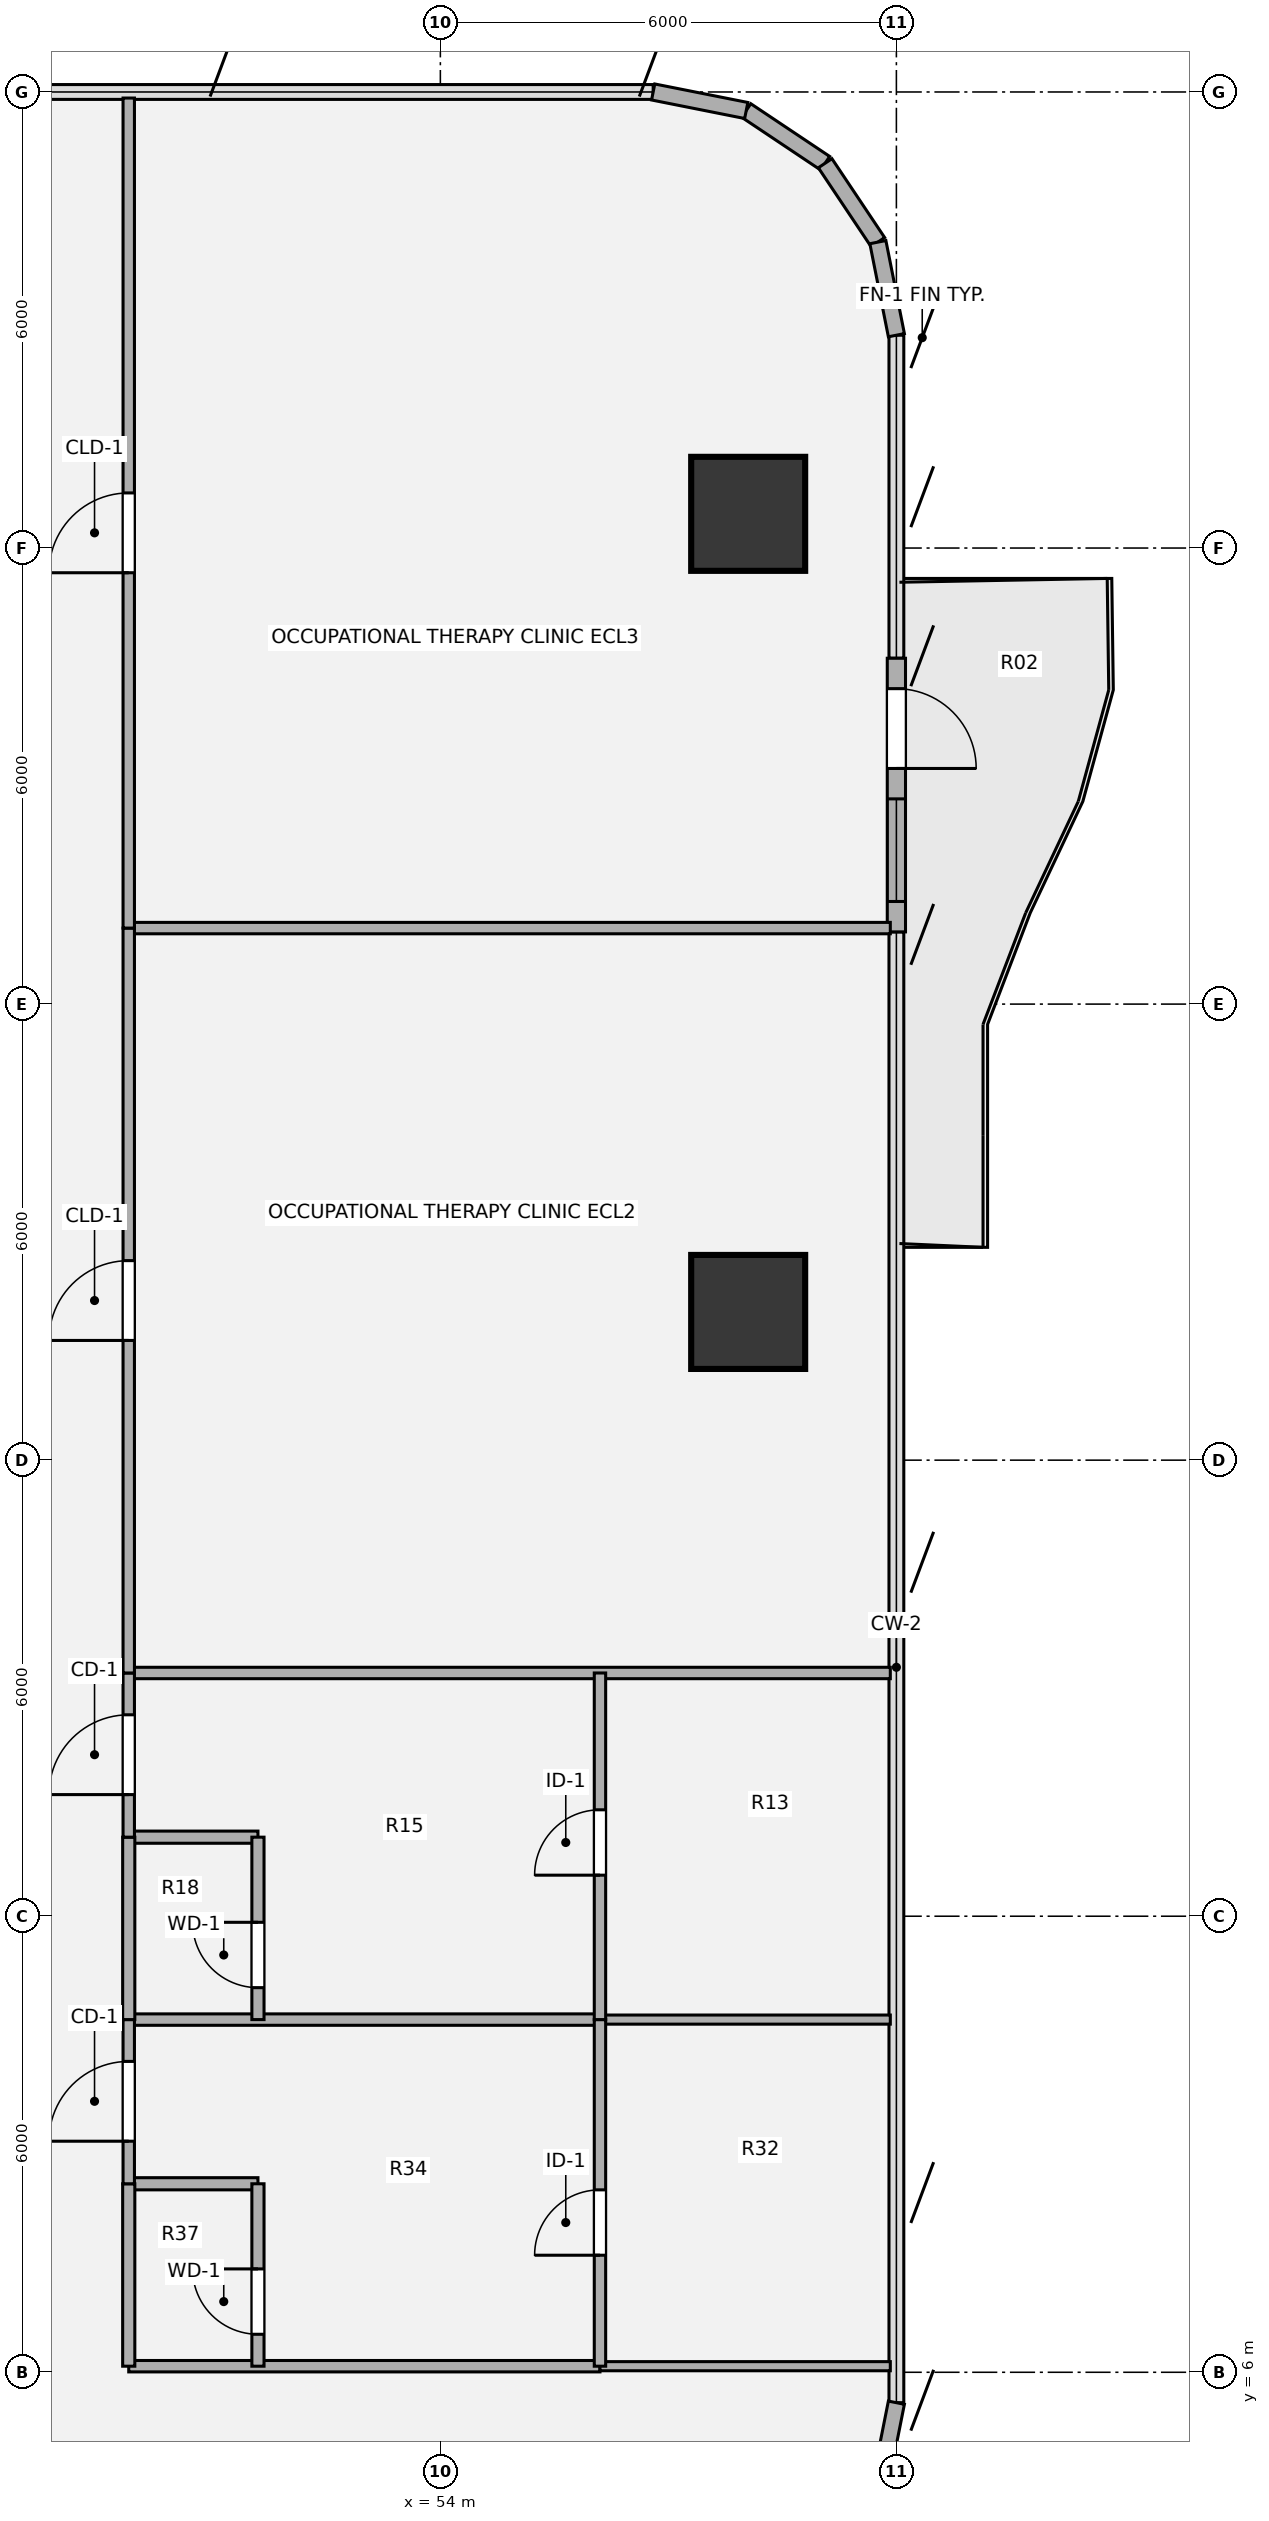
"""IFC4 building model, lengths in metres.
Left out: names, types, materials, properties, quantities, classifications, styles, units other than length and angle.
Written with IfcOpenShell. Run it as: python <this file> out.ifc"""

import sys

from ifc_helpers import new_model, si_unit, direction, frame, frame_2d, origin, origin_2d, place, context, subcontext, project, spatial, rectangle, hollow_circle, extrude, source, transform, mapped, element, fill, save


model = new_model("IFC4")
c1 = context("Model", 3, precision=1e-05, world=origin(), true_north=direction((0.0, 1.0)))
c2 = subcontext(c1, "Body", "Model", "MODEL_VIEW")
j1 = project(units=[si_unit("LENGTHUNIT", "METRE"), si_unit("PLANEANGLEUNIT", "RADIAN")], contexts=[c1])
p1 = place(None, origin())
s1 = spatial("IfcSite", under=j1, at=p1, CompositionType="ELEMENT")
p2 = place(p1, origin())
s2 = spatial("IfcBuilding", under=s1, at=p2, CompositionType="ELEMENT")
p3 = place(p2, frame((0.0, 0.0, 45.9)))
s3 = spatial("IfcBuildingStorey", under=s2, at=p3, CompositionType="ELEMENT", Elevation=45.9)
m1 = source(origin(), c2, "Body", "SweptSolid", [
    extrude(hollow_circle(Radius=0.75, WallThickness=0.05, at=origin_2d()), origin(), (0.0, 0.0, 1.0), 3.78),
])
for number, where, z_axis, x_axis in (
    (1, (58.05, 19.95, 0.0), (0.0, 0.0, 1.0), (1.0, 0.0, 0.0)),
    (2, (58.05, 30.45, 0.0), (0.0, 0.0, 1.0), (1.0, 0.0, 0.0)),
):
    element("IfcColumn", number, at=place(p3, frame(where, z_axis=z_axis, x_axis=x_axis)), inside=s3, PredefinedType="COLUMN", context=c2, shape_type="MappedRepresentation", body=[
        mapped(m1, transform((0.0, 0.0, 0.0), x_axis=(1.0, 0.0, 0.0), y_axis=(0.0, 1.0, 0.0), z_axis=(0.0, 0.0, 1.0), scale=1.0)),
    ])
for number, where, z_axis, x_axis in (
    (3, (58.025, 35.756, 0.0), (0.0, 0.0, 1.0), (0.831, -0.556, 0.0)),
    (4, (59.063, 35.063, 0.0), (0.0, 0.0, 1.0), (0.556, -0.831, 0.0)),
    (5, (59.756, 34.025, 0.0), (0.0, 0.0, 1.0), (0.195, -0.981, 0.0)),
):
    element("IfcWall", number, at=place(p3, frame(where, z_axis=z_axis, x_axis=x_axis)), inside=s3, PredefinedType="SOLIDWALL", context=c2, shape_type="SweptSolid", body=[
        extrude(rectangle(XDim=1.249, YDim=0.215, at=frame_2d((0.624, 0.0))), origin(), (0.0, 0.0, 1.0), 3.53),
    ])
p4 = place(p3, frame((60.0, 28.55, 0.0), z_axis=(0.0, 0.0, 1.0), x_axis=(0.0, -1.0, 0.0)))
e6 = element("IfcWall", 6, at=p4, inside=s3, PredefinedType="SOLIDWALL", context=c2, shape_type="SweptSolid", body=[
    extrude(rectangle(XDim=3.6, YDim=0.24, at=frame_2d((1.8, 0.0))), origin(), (0.0, 0.0, 1.0), 3.53),
])
p5 = place(p4, frame((0.4, 0.0, 0.0)))
e7 = element("IfcOpeningElement", 7, at=p5, cuts=e6, PredefinedType="OPENING", context=c2, shape_type="SweptSolid", body=[
    extrude(rectangle(XDim=1.05, YDim=2.15, at=origin_2d()), frame((0.525, 0.13, 1.075), z_axis=(0.0, -1.0, 0.0), x_axis=(1.0, 0.0, 0.0)), (0.0, 0.0, 1.0), 0.26),
])
p6 = place(p4, frame((1.85, 0.0, 0.85)))
e8 = element("IfcOpeningElement", 8, at=p6, cuts=e6, PredefinedType="OPENING", context=c2, shape_type="SweptSolid", body=[
    extrude(rectangle(XDim=1.35, YDim=1.35, at=origin_2d()), frame((0.675, 0.13, 0.675), z_axis=(0.0, -1.0, 0.0), x_axis=(1.0, 0.0, 0.0)), (0.0, 0.0, 1.0), 0.26),
])
for number, where, z_axis, x_axis in (
    (9, (60.0, 5.6, 0.0), (0.0, 0.0, 1.0), (-0.195, -0.981, 0.0)),
    (10, (56.8, 36.0, 0.0), (0.0, 0.0, 1.0), (0.981, -0.195, 0.0)),
):
    element("IfcWall", number, at=place(p3, frame(where, z_axis=z_axis, x_axis=x_axis)), inside=s3, PredefinedType="SOLIDWALL", context=c2, shape_type="SweptSolid", body=[
        extrude(rectangle(XDim=1.249, YDim=0.215, at=frame_2d((0.624, 0.0))), origin(), (0.0, 0.0, 1.0), 3.53),
    ])
p7 = place(p3, frame((49.9, 6.08, 0.0), z_axis=(0.0, 0.0, 1.0), x_axis=(1.0, 0.0, 0.0)))
e11 = element("IfcWall", 11, at=p7, inside=s3, PredefinedType="PARTITIONING", context=c2, shape_type="SweptSolid", body=[
    extrude(rectangle(XDim=6.2, YDim=0.15, at=frame_2d((3.1, 0.0))), origin(), (0.0, 0.0, 1.0), 3.5),
])
p8 = place(p3, frame((56.1, 6.08, 0.0), z_axis=(0.0, 0.0, 1.0), x_axis=(1.0, 0.0, 0.0)))
e12 = element("IfcWall", 12, at=p8, inside=s3, PredefinedType="PARTITIONING", context=c2, shape_type="SweptSolid", body=[
    extrude(rectangle(XDim=3.82, YDim=0.12, at=frame_2d((1.91, 0.0))), origin(), (0.0, 0.0, 1.0), 3.5),
])
p9 = place(p3, frame((49.9, 8.48, 0.0), z_axis=(0.0, 0.0, 1.0), x_axis=(1.0, 0.0, 0.0)))
e13 = element("IfcWall", 13, at=p9, inside=s3, PredefinedType="PLUMBINGWALL", context=c2, shape_type="SweptSolid", body=[
    extrude(rectangle(XDim=1.7, YDim=0.16, at=frame_2d((0.85, 0.0))), origin(), (0.0, 0.0, 1.0), 3.5),
])
p10 = place(p3, frame((49.9, 10.64, 0.0), z_axis=(0.0, 0.0, 1.0), x_axis=(1.0, 0.0, 0.0)))
e14 = element("IfcWall", 14, at=p10, inside=s3, PredefinedType="PARTITIONING", context=c2, shape_type="SweptSolid", body=[
    extrude(rectangle(XDim=6.2, YDim=0.15, at=frame_2d((3.1, 0.0))), origin(), (0.0, 0.0, 1.0), 3.5),
])
p11 = place(p3, frame((56.1, 10.64, 0.0), z_axis=(0.0, 0.0, 1.0), x_axis=(1.0, 0.0, 0.0)))
e15 = element("IfcWall", 15, at=p11, inside=s3, PredefinedType="PARTITIONING", context=c2, shape_type="SweptSolid", body=[
    extrude(rectangle(XDim=3.82, YDim=0.12, at=frame_2d((1.91, 0.0))), origin(), (0.0, 0.0, 1.0), 3.5),
])
p12 = place(p3, frame((49.9, 13.04, 0.0), z_axis=(0.0, 0.0, 1.0), x_axis=(1.0, 0.0, 0.0)))
e16 = element("IfcWall", 16, at=p12, inside=s3, PredefinedType="PLUMBINGWALL", context=c2, shape_type="SweptSolid", body=[
    extrude(rectangle(XDim=1.7, YDim=0.16, at=frame_2d((0.85, 0.0))), origin(), (0.0, 0.0, 1.0), 3.5),
])
p13 = place(p3, frame((49.9, 15.2, 0.0), z_axis=(0.0, 0.0, 1.0), x_axis=(1.0, 0.0, 0.0)))
e17 = element("IfcWall", 17, at=p13, inside=s3, PredefinedType="PARTITIONING", context=c2, shape_type="SweptSolid", body=[
    extrude(rectangle(XDim=10.02, YDim=0.15, at=frame_2d((5.01, 0.0))), origin(), (0.0, 0.0, 1.0), 3.5),
])
p14 = place(p3, frame((49.9, 25.0, 0.0), z_axis=(0.0, 0.0, 1.0), x_axis=(1.0, 0.0, 0.0)))
e18 = element("IfcWall", 18, at=p14, inside=s3, PredefinedType="PARTITIONING", context=c2, shape_type="SweptSolid", body=[
    extrude(rectangle(XDim=10.02, YDim=0.15, at=frame_2d((5.01, 0.0))), origin(), (0.0, 0.0, 1.0), 2.982),
])
p15 = place(p3, frame((49.9, 6.08, 0.0), z_axis=(0.0, 0.0, 1.0), x_axis=(0.0, 1.0, 0.0)))
e19 = element("IfcWall", 19, at=p15, inside=s3, PredefinedType="PLUMBINGWALL", context=c2, shape_type="SweptSolid", body=[
    extrude(rectangle(XDim=2.4, YDim=0.16, at=frame_2d((1.2, 0.0))), origin(), (0.0, 0.0, 1.0), 3.5),
])
p16 = place(p3, frame((49.9, 8.48, 0.0), z_axis=(0.0, 0.0, 1.0), x_axis=(0.0, 1.0, 0.0)))
e20 = element("IfcWall", 20, at=p16, inside=s3, PredefinedType="PARTITIONING", context=c2, shape_type="SweptSolid", body=[
    extrude(rectangle(XDim=2.16, YDim=0.15, at=frame_2d((1.08, 0.0))), origin(), (0.0, 0.0, 1.0), 3.5),
])
p17 = place(p16, frame((0.56, 0.0, 0.0)))
e21 = element("IfcOpeningElement", 21, at=p17, cuts=e20, PredefinedType="OPENING", context=c2, shape_type="SweptSolid", body=[
    extrude(rectangle(XDim=1.05, YDim=2.1, at=origin_2d()), frame((0.525, 0.085, 1.05), z_axis=(0.0, -1.0, 0.0), x_axis=(1.0, 0.0, 0.0)), (0.0, 0.0, 1.0), 0.17),
])
p18 = place(p3, frame((49.9, 10.64, 0.0), z_axis=(0.0, 0.0, 1.0), x_axis=(0.0, 1.0, 0.0)))
e22 = element("IfcWall", 22, at=p18, inside=s3, PredefinedType="PLUMBINGWALL", context=c2, shape_type="SweptSolid", body=[
    extrude(rectangle(XDim=2.4, YDim=0.16, at=frame_2d((1.2, 0.0))), origin(), (0.0, 0.0, 1.0), 3.5),
])
p19 = place(p3, frame((49.9, 13.04, 0.0), z_axis=(0.0, 0.0, 1.0), x_axis=(0.0, 1.0, 0.0)))
e23 = element("IfcWall", 23, at=p19, inside=s3, PredefinedType="PARTITIONING", context=c2, shape_type="SweptSolid", body=[
    extrude(rectangle(XDim=2.16, YDim=0.15, at=frame_2d((1.08, 0.0))), origin(), (0.0, 0.0, 1.0), 3.5),
])
p20 = place(p19, frame((0.56, 0.0, 0.0)))
e24 = element("IfcOpeningElement", 24, at=p20, cuts=e23, PredefinedType="OPENING", context=c2, shape_type="SweptSolid", body=[
    extrude(rectangle(XDim=1.05, YDim=2.1, at=origin_2d()), frame((0.525, 0.085, 1.05), z_axis=(0.0, -1.0, 0.0), x_axis=(1.0, 0.0, 0.0)), (0.0, 0.0, 1.0), 0.17),
])
p21 = place(p3, frame((49.9, 15.2, 0.0), z_axis=(0.0, 0.0, 1.0), x_axis=(0.0, 1.0, 0.0)))
e25 = element("IfcWall", 25, at=p21, inside=s3, PredefinedType="PARTITIONING", context=c2, shape_type="SweptSolid", body=[
    extrude(rectangle(XDim=9.8, YDim=0.15, at=frame_2d((4.9, 0.0))), origin(), (0.0, 0.0, 1.0), 3.5),
])
p22 = place(p21, frame((4.375, 0.0, 0.0)))
e26 = element("IfcOpeningElement", 26, at=p22, cuts=e25, PredefinedType="OPENING", context=c2, shape_type="SweptSolid", body=[
    extrude(rectangle(XDim=1.05, YDim=2.1, at=origin_2d()), frame((0.525, 0.085, 1.05), z_axis=(0.0, -1.0, 0.0), x_axis=(1.0, 0.0, 0.0)), (0.0, 0.0, 1.0), 0.17),
])
p23 = place(p3, frame((49.9, 25.0, 0.0), z_axis=(0.0, 0.0, 1.0), x_axis=(0.0, 1.0, 0.0)))
e27 = element("IfcWall", 27, at=p23, inside=s3, PredefinedType="PARTITIONING", context=c2, shape_type="SweptSolid", body=[
    extrude(rectangle(XDim=10.92, YDim=0.15, at=frame_2d((5.46, 0.0))), origin(), (0.0, 0.0, 1.0), 3.5),
])
p24 = place(p23, frame((4.675, 0.0, 0.0)))
e28 = element("IfcOpeningElement", 28, at=p24, cuts=e27, PredefinedType="OPENING", context=c2, shape_type="SweptSolid", body=[
    extrude(rectangle(XDim=1.05, YDim=2.1, at=origin_2d()), frame((0.525, 0.085, 1.05), z_axis=(0.0, -1.0, 0.0), x_axis=(1.0, 0.0, 0.0)), (0.0, 0.0, 1.0), 0.17),
])
p25 = place(p3, frame((51.6, 6.08, 0.0), z_axis=(0.0, 0.0, 1.0), x_axis=(0.0, 1.0, 0.0)))
e29 = element("IfcWall", 29, at=p25, inside=s3, PredefinedType="PLUMBINGWALL", context=c2, shape_type="SweptSolid", body=[
    extrude(rectangle(XDim=2.4, YDim=0.16, at=frame_2d((1.2, 0.0))), origin(), (0.0, 0.0, 1.0), 3.5),
])
p26 = place(p25, frame((0.42, 0.0, 0.0)))
e30 = element("IfcOpeningElement", 30, at=p26, cuts=e29, PredefinedType="OPENING", context=c2, shape_type="SweptSolid", body=[
    extrude(rectangle(XDim=0.86, YDim=2.1, at=origin_2d()), frame((0.43, 0.09, 1.05), z_axis=(0.0, -1.0, 0.0), x_axis=(1.0, 0.0, 0.0)), (0.0, 0.0, 1.0), 0.18),
])
p27 = place(p3, frame((51.6, 10.64, 0.0), z_axis=(0.0, 0.0, 1.0), x_axis=(0.0, 1.0, 0.0)))
e31 = element("IfcWall", 31, at=p27, inside=s3, PredefinedType="PLUMBINGWALL", context=c2, shape_type="SweptSolid", body=[
    extrude(rectangle(XDim=2.4, YDim=0.16, at=frame_2d((1.2, 0.0))), origin(), (0.0, 0.0, 1.0), 3.5),
])
p28 = place(p27, frame((0.42, 0.0, 0.0)))
e32 = element("IfcOpeningElement", 32, at=p28, cuts=e31, PredefinedType="OPENING", context=c2, shape_type="SweptSolid", body=[
    extrude(rectangle(XDim=0.86, YDim=2.1, at=origin_2d()), frame((0.43, 0.09, 1.05), z_axis=(0.0, -1.0, 0.0), x_axis=(1.0, 0.0, 0.0)), (0.0, 0.0, 1.0), 0.18),
])
p29 = place(p3, frame((56.1, 6.08, 0.0), z_axis=(0.0, 0.0, 1.0), x_axis=(0.0, 1.0, 0.0)))
e33 = element("IfcWall", 33, at=p29, inside=s3, PredefinedType="PARTITIONING", context=c2, shape_type="SweptSolid", body=[
    extrude(rectangle(XDim=4.56, YDim=0.15, at=frame_2d((2.28, 0.0))), origin(), (0.0, 0.0, 1.0), 3.5),
])
p30 = place(p29, frame((1.46, 0.0, 0.0)))
e34 = element("IfcOpeningElement", 34, at=p30, cuts=e33, PredefinedType="OPENING", context=c2, shape_type="SweptSolid", body=[
    extrude(rectangle(XDim=0.86, YDim=2.1, at=origin_2d()), frame((0.43, 0.085, 1.05), z_axis=(0.0, -1.0, 0.0), x_axis=(1.0, 0.0, 0.0)), (0.0, 0.0, 1.0), 0.17),
])
p31 = place(p3, frame((56.1, 10.64, 0.0), z_axis=(0.0, 0.0, 1.0), x_axis=(0.0, 1.0, 0.0)))
e35 = element("IfcWall", 35, at=p31, inside=s3, PredefinedType="PARTITIONING", context=c2, shape_type="SweptSolid", body=[
    extrude(rectangle(XDim=4.56, YDim=0.15, at=frame_2d((2.28, 0.0))), origin(), (0.0, 0.0, 1.0), 3.5),
])
p32 = place(p31, frame((1.9, 0.0, 0.0)))
e36 = element("IfcOpeningElement", 36, at=p32, cuts=e35, PredefinedType="OPENING", context=c2, shape_type="SweptSolid", body=[
    extrude(rectangle(XDim=0.86, YDim=2.1, at=origin_2d()), frame((0.43, 0.085, 1.05), z_axis=(0.0, -1.0, 0.0), x_axis=(1.0, 0.0, 0.0)), (0.0, 0.0, 1.0), 0.17),
])
m2 = source(origin(), c2, "Body", "SweptSolid", [
    extrude(rectangle(XDim=1.05, YDim=2.15, at=origin_2d()), frame((0.525, 0.025, 1.075), z_axis=(0.0, -1.0, 0.0), x_axis=(1.0, 0.0, 0.0)), (0.0, 0.0, 1.0), 0.05),
])
p33 = place(p5, origin())
e37 = element("IfcDoor", 37, at=p33, inside=s3, OperationType="SINGLE_SWING_RIGHT", PredefinedType="DOOR", context=c2, shape_type="MappedRepresentation", body=[
    mapped(m2, transform((0.0, 0.0, 0.0), x_axis=(1.0, 0.0, 0.0), y_axis=(0.0, 1.0, 0.0), z_axis=(0.0, 0.0, 1.0), scale=1.0)),
])
fill(e7, e37)
m3 = source(origin(), c2, "Body", "SweptSolid", [
    extrude(rectangle(XDim=1.35, YDim=1.35, at=origin_2d()), frame((0.675, 0.03, 0.675), z_axis=(0.0, -1.0, 0.0), x_axis=(1.0, 0.0, 0.0)), (0.0, 0.0, 1.0), 0.06),
])
p34 = place(p6, origin())
e38 = element("IfcWindow", 38, at=p34, inside=s3, PartitioningType="SINGLE_PANEL", PredefinedType="WINDOW", context=c2, shape_type="MappedRepresentation", body=[
    mapped(m3, transform((0.0, 0.0, 0.0), x_axis=(1.0, 0.0, 0.0), y_axis=(0.0, 1.0, 0.0), z_axis=(0.0, 0.0, 1.0), scale=1.0)),
])
fill(e8, e38)
m4 = source(origin(), c2, "Body", "SweptSolid", [
    extrude(rectangle(XDim=1.05, YDim=2.1, at=origin_2d()), frame((0.525, 0.025, 1.05), z_axis=(0.0, -1.0, 0.0), x_axis=(1.0, 0.0, 0.0)), (0.0, 0.0, 1.0), 0.05),
])
p35 = place(p17, origin())
e39 = element("IfcDoor", 39, at=p35, inside=s3, OperationType="SINGLE_SWING_LEFT", PredefinedType="DOOR", context=c2, shape_type="MappedRepresentation", body=[
    mapped(m4, transform((0.0, 0.0, 0.0), x_axis=(1.0, 0.0, 0.0), y_axis=(0.0, 1.0, 0.0), z_axis=(0.0, 0.0, 1.0), scale=1.0)),
])
fill(e21, e39)
p36 = place(p20, origin())
e40 = element("IfcDoor", 40, at=p36, inside=s3, OperationType="SINGLE_SWING_LEFT", PredefinedType="DOOR", context=c2, shape_type="MappedRepresentation", body=[
    mapped(m4, transform((0.0, 0.0, 0.0), x_axis=(1.0, 0.0, 0.0), y_axis=(0.0, 1.0, 0.0), z_axis=(0.0, 0.0, 1.0), scale=1.0)),
])
fill(e24, e40)
m5 = source(origin(), c2, "Body", "SweptSolid", [
    extrude(rectangle(XDim=1.05, YDim=2.1, at=origin_2d()), frame((0.525, 0.025, 1.05), z_axis=(0.0, -1.0, 0.0), x_axis=(1.0, 0.0, 0.0)), (0.0, 0.0, 1.0), 0.05),
])
p37 = place(p22, origin())
e41 = element("IfcDoor", 41, at=p37, inside=s3, OperationType="SINGLE_SWING_LEFT", PredefinedType="DOOR", context=c2, shape_type="MappedRepresentation", body=[
    mapped(m5, transform((0.0, 0.0, 0.0), x_axis=(1.0, 0.0, 0.0), y_axis=(0.0, 1.0, 0.0), z_axis=(0.0, 0.0, 1.0), scale=1.0)),
])
fill(e26, e41)
p38 = place(p24, origin())
e42 = element("IfcDoor", 42, at=p38, inside=s3, OperationType="SINGLE_SWING_LEFT", PredefinedType="DOOR", context=c2, shape_type="MappedRepresentation", body=[
    mapped(m5, transform((0.0, 0.0, 0.0), x_axis=(1.0, 0.0, 0.0), y_axis=(0.0, 1.0, 0.0), z_axis=(0.0, 0.0, 1.0), scale=1.0)),
])
fill(e28, e42)
m6 = source(origin(), c2, "Body", "SweptSolid", [
    extrude(rectangle(XDim=0.86, YDim=2.1, at=origin_2d()), frame((0.43, 0.025, 1.05), z_axis=(0.0, -1.0, 0.0), x_axis=(1.0, 0.0, 0.0)), (0.0, 0.0, 1.0), 0.05),
])
p39 = place(p26, origin())
e43 = element("IfcDoor", 43, at=p39, inside=s3, OperationType="SINGLE_SWING_RIGHT", PredefinedType="DOOR", context=c2, shape_type="MappedRepresentation", body=[
    mapped(m6, transform((0.0, 0.0, 0.0), x_axis=(1.0, 0.0, 0.0), y_axis=(0.0, 1.0, 0.0), z_axis=(0.0, 0.0, 1.0), scale=1.0)),
])
fill(e30, e43)
p40 = place(p28, origin())
e44 = element("IfcDoor", 44, at=p40, inside=s3, OperationType="SINGLE_SWING_RIGHT", PredefinedType="DOOR", context=c2, shape_type="MappedRepresentation", body=[
    mapped(m6, transform((0.0, 0.0, 0.0), x_axis=(1.0, 0.0, 0.0), y_axis=(0.0, 1.0, 0.0), z_axis=(0.0, 0.0, 1.0), scale=1.0)),
])
fill(e32, e44)
m7 = source(origin(), c2, "Body", "SweptSolid", [
    extrude(rectangle(XDim=0.86, YDim=2.1, at=origin_2d()), frame((0.43, 0.025, 1.05), z_axis=(0.0, -1.0, 0.0), x_axis=(1.0, 0.0, 0.0)), (0.0, 0.0, 1.0), 0.05),
])
p41 = place(p30, origin())
e45 = element("IfcDoor", 45, at=p41, inside=s3, OperationType="SINGLE_SWING_LEFT", PredefinedType="DOOR", context=c2, shape_type="MappedRepresentation", body=[
    mapped(m7, transform((0.0, 0.0, 0.0), x_axis=(1.0, 0.0, 0.0), y_axis=(0.0, 1.0, 0.0), z_axis=(0.0, 0.0, 1.0), scale=1.0)),
])
fill(e34, e45)
p42 = place(p32, origin())
e46 = element("IfcDoor", 46, at=p42, inside=s3, OperationType="SINGLE_SWING_LEFT", PredefinedType="DOOR", context=c2, shape_type="MappedRepresentation", body=[
    mapped(m7, transform((0.0, 0.0, 0.0), x_axis=(1.0, 0.0, 0.0), y_axis=(0.0, 1.0, 0.0), z_axis=(0.0, 0.0, 1.0), scale=1.0)),
])
fill(e36, e46)
save(model, sys.argv[1])
